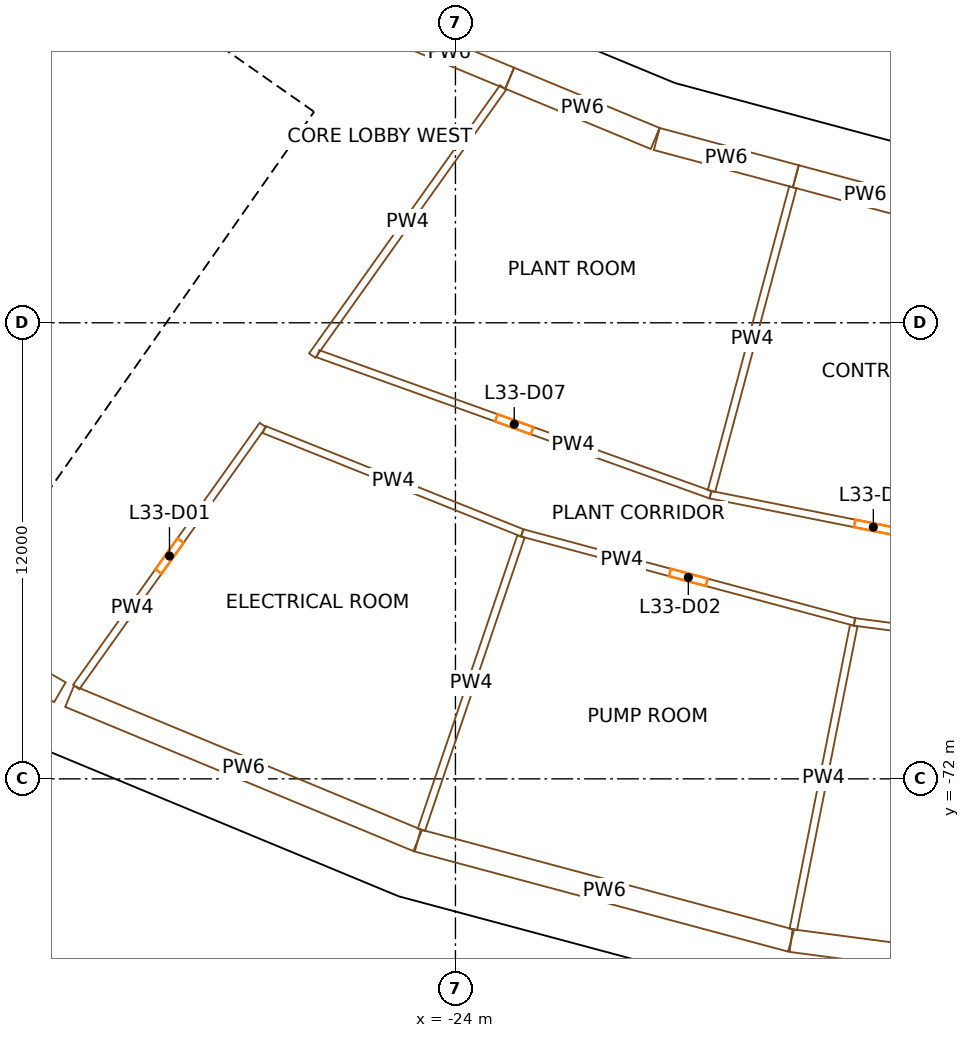
"""IFC4 building model, lengths in metres.
Left out: names, types, materials, properties, quantities, classifications, styles, units other than length and angle.
Written with IfcOpenShell. Run it as: python <this file> out.ifc"""

import sys

from ifc_helpers import new_model, si_unit, direction, frame, frame_2d, origin, origin_2d, place, context, subcontext, project, spatial, rectangle, extrude, element, fill, save


model = new_model("IFC4")
c1 = context("Model", 3, precision=1e-05, world=origin(), true_north=direction((0.0, 1.0)))
c2 = subcontext(c1, "Body", "Model", "MODEL_VIEW")
j1 = project(units=[si_unit("LENGTHUNIT", "METRE"), si_unit("PLANEANGLEUNIT", "RADIAN")], contexts=[c1])
p1 = place(None, origin())
s1 = spatial("IfcSite", under=j1, at=p1, CompositionType="ELEMENT")
p2 = place(p1, origin())
s2 = spatial("IfcBuilding", under=s1, at=p2, CompositionType="ELEMENT")
p3 = place(p2, frame((0.0, 0.0, 144.3)))
s3 = spatial("IfcBuildingStorey", under=s2, at=p3, CompositionType="ELEMENT", Elevation=144.3)
for number, where, z_axis, x_axis in (
    (1, (-25.763, -52.243, 0.0), (0.0, 0.0, 1.0), (0.897, -0.442, 0.0)),
    (2, (-34.388, -69.732, 0.0), (0.0, 0.0, 1.0), (0.897, -0.442, 0.0)),
    (3, (-18.724, -55.159, 0.0), (0.0, 0.0, 1.0), (0.947, -0.321, 0.0)),
    (4, (-24.992, -73.624, 0.0), (0.0, 0.0, 1.0), (0.947, -0.321, 0.0)),
    (5, (-15.168, -76.256, 0.0), (0.0, 0.0, 1.0), (0.981, -0.195, 0.0)),
):
    element("IfcColumn", number, at=place(p3, frame(where, z_axis=z_axis, x_axis=x_axis)), inside=s3, PredefinedType="COLUMN", context=c2, shape_type="SweptSolid", body=[
        extrude(rectangle(XDim=1.2, YDim=1.5, at=origin_2d()), origin(), (0.0, 0.0, 1.0), 5.0),
    ])
p4 = place(p3, frame((-36.717, -66.337, 0.0), z_axis=(0.0, 0.0, 1.0), x_axis=(0.573577477574, 0.819151315216, 0.0)))
e6 = element("IfcWall", 6, at=p4, inside=s3, PredefinedType="SHEAR", context=c2, shape_type="SweptSolid", body=[
    extrude(rectangle(XDim=14.8, YDim=0.9, at=frame_2d((7.4, 0.0))), origin(), (0.0, 0.0, 1.0), 4.7),
])
p5 = place(p4, frame((6.2, 0.0, 0.0)))
e7 = element("IfcOpeningElement", 7, at=p5, cuts=e6, PredefinedType="OPENING", context=c2, shape_type="SweptSolid", body=[
    extrude(rectangle(XDim=2.4, YDim=2.1, at=frame_2d((1.2, 1.05))), frame((0.0, 0.46, 0.0), z_axis=(0.0, -1.0, 0.0), x_axis=(1.0, 0.0, 0.0)), (0.0, 0.0, 1.0), 0.92),
])
p6 = place(p3, frame((-28.854, -54.324, 0.0), z_axis=(0.0, 0.0, 1.0), x_axis=(-0.819145767589, 0.573585400304, 0.0)))
e8 = element("IfcWall", 8, at=p6, inside=s3, PredefinedType="SHEAR", context=c2, shape_type="SweptSolid", body=[
    extrude(rectangle(XDim=15.045, YDim=0.9, at=frame_2d((7.523, 0.0))), origin(), (0.0, 0.0, 1.0), 4.7),
])
p7 = place(p6, frame((3.45, 0.0, 0.0)))
e9 = element("IfcOpeningElement", 9, at=p7, cuts=e8, PredefinedType="OPENING", context=c2, shape_type="SweptSolid", body=[
    extrude(rectangle(XDim=1.0, YDim=2.1, at=frame_2d((0.5, 1.05))), frame((0.0, 0.46, 0.0), z_axis=(0.0, -1.0, 0.0), x_axis=(1.0, 0.0, 0.0)), (0.0, 0.0, 1.0), 0.92),
])
p8 = place(p6, frame((13.495, 0.0, 0.0)))
e10 = element("IfcOpeningElement", 10, at=p8, cuts=e8, PredefinedType="OPENING", context=c2, shape_type="SweptSolid", body=[
    extrude(rectangle(XDim=1.1, YDim=2.1, at=frame_2d((0.55, 1.05))), frame((0.0, 0.46, 0.0), z_axis=(0.0, -1.0, 0.0), x_axis=(1.0, 0.0, 0.0)), (0.0, 0.0, 1.0), 0.92),
])
p9 = place(p3, frame((-31.895, -58.666, 0.0), z_axis=(0.0, 0.0, 1.0), x_axis=(-0.819166993208, 0.573555086491, 0.0)))
e11 = element("IfcWall", 11, at=p9, inside=s3, PredefinedType="SOLIDWALL", context=c2, shape_type="SweptSolid", body=[
    extrude(rectangle(XDim=7.95, YDim=0.3, at=frame_2d((3.975, 0.0))), origin(), (0.0, 0.0, 1.0), 4.7),
])
p10 = place(p9, frame((0.675, 0.0, 0.0)))
e12 = element("IfcOpeningElement", 12, at=p10, cuts=e11, PredefinedType="OPENING", context=c2, shape_type="SweptSolid", body=[
    extrude(rectangle(XDim=1.1, YDim=2.1, at=frame_2d((0.55, 1.05))), frame((0.0, 0.16, 0.0), z_axis=(0.0, -1.0, 0.0), x_axis=(1.0, 0.0, 0.0)), (0.0, 0.0, 1.0), 0.32),
])
p11 = place(p9, frame((3.425, 0.0, 0.0)))
e13 = element("IfcOpeningElement", 13, at=p11, cuts=e11, PredefinedType="OPENING", context=c2, shape_type="SweptSolid", body=[
    extrude(rectangle(XDim=1.1, YDim=2.1, at=frame_2d((0.55, 1.05))), frame((0.0, 0.16, 0.0), z_axis=(0.0, -1.0, 0.0), x_axis=(1.0, 0.0, 0.0)), (0.0, 0.0, 1.0), 0.32),
])
p12 = place(p9, frame((6.175, 0.0, 0.0)))
e14 = element("IfcOpeningElement", 14, at=p12, cuts=e11, PredefinedType="OPENING", context=c2, shape_type="SweptSolid", body=[
    extrude(rectangle(XDim=1.1, YDim=2.1, at=frame_2d((0.55, 1.05))), frame((0.0, 0.16, 0.0), z_axis=(0.0, -1.0, 0.0), x_axis=(1.0, 0.0, 0.0)), (0.0, 0.0, 1.0), 0.32),
])
p13 = place(p3, frame((-30.461, -56.618, 0.0), z_axis=(0.0, 0.0, 1.0), x_axis=(-0.819142461705, 0.573590121456, 0.0)))
e15 = element("IfcWall", 15, at=p13, inside=s3, PredefinedType="SOLIDWALL", context=c2, shape_type="SweptSolid", body=[
    extrude(rectangle(XDim=7.95, YDim=0.3, at=frame_2d((3.975, 0.0))), origin(), (0.0, 0.0, 1.0), 4.7),
])
p14 = place(p3, frame((-33.938, -57.052, 0.0), z_axis=(0.0, 0.0, 1.0), x_axis=(0.573581496053, 0.819148501424, 0.0)))
e16 = element("IfcWall", 16, at=p14, inside=s3, PredefinedType="SOLIDWALL", context=c2, shape_type="SweptSolid", body=[
    extrude(rectangle(XDim=2.2, YDim=0.3, at=frame_2d((1.1, 0.0))), origin(), (0.0, 0.0, 1.0), 4.7),
])
p15 = place(p3, frame((-33.787, -61.369, 3.4), z_axis=(0.0, 0.0, 1.0), x_axis=(-0.819152564888, 0.573575692858, 0.0)))
e17 = element("IfcWall", 17, at=p15, inside=s3, PredefinedType="SOLIDWALL", context=c2, shape_type="SweptSolid", body=[
    extrude(rectangle(XDim=7.95, YDim=0.3, at=frame_2d((3.975, 0.0))), origin(), (0.0, 0.0, 1.0), 1.3),
])
p16 = place(p3, frame((-18.337, -53.861, 0.0), z_axis=(0.0, 0.0, 1.0), x_axis=(-0.923875784142, 0.382692481603, 0.0)))
e18 = element("IfcWall", 18, at=p16, inside=s3, PredefinedType="SOLIDWALL", context=c2, shape_type="SweptSolid", body=[
    extrude(rectangle(XDim=7.342, YDim=0.4, at=frame_2d((3.671, 0.0))), origin(), (0.0, 0.0, 1.0), 3.6),
])
p17 = place(p3, frame((-11.077, -55.813, 0.0), z_axis=(0.0, 0.0, 1.0), x_axis=(-0.965928708291, 0.258808289086, 0.0)))
e19 = element("IfcWall", 19, at=p17, inside=s3, PredefinedType="SOLIDWALL", context=c2, shape_type="SweptSolid", body=[
    extrude(rectangle(XDim=7.493, YDim=0.4, at=frame_2d((3.747, 0.0))), origin(), (0.0, 0.0, 1.0), 3.6),
])
p18 = place(p3, frame((-35.008, -70.933, 0.0), z_axis=(0.0, 0.0, 1.0), x_axis=(0.923878024815, -0.382687072245, 0.0)))
e20 = element("IfcWall", 20, at=p18, inside=s3, PredefinedType="SOLIDWALL", context=c2, shape_type="SweptSolid", body=[
    extrude(rectangle(XDim=10.397, YDim=0.4, at=frame_2d((5.198, 0.0))), origin(), (0.0, 0.0, 1.0), 3.6),
])
p19 = place(p3, frame((-25.377, -74.915, 0.0), z_axis=(0.0, 0.0, 1.0), x_axis=(0.965921778254, -0.258834152101, 0.0)))
e21 = element("IfcWall", 21, at=p19, inside=s3, PredefinedType="SOLIDWALL", context=c2, shape_type="SweptSolid", body=[
    extrude(rectangle(XDim=10.245, YDim=0.4, at=frame_2d((5.123, 0.0))), origin(), (0.0, 0.0, 1.0), 3.6),
])
p20 = place(p3, frame((-43.176, -64.658, 0.0), z_axis=(0.0, 0.0, 1.0), x_axis=(0.866037016931, -0.4999798849, 0.0)))
e22 = element("IfcWall", 22, at=p20, inside=s3, PredefinedType="PARTITIONING", context=c2, shape_type="SweptSolid", body=[
    extrude(rectangle(XDim=10.125, YDim=0.6, at=frame_2d((5.062, 0.0))), origin(), (0.0, 0.0, 1.0), 3.6),
])
p21 = place(p3, frame((-34.153, -69.829, 0.0), z_axis=(0.0, 0.0, 1.0), x_axis=(0.923879094783, -0.382684489133, 0.0)))
e23 = element("IfcWall", 23, at=p21, inside=s3, PredefinedType="PARTITIONING", context=c2, shape_type="SweptSolid", body=[
    extrude(rectangle(XDim=9.916, YDim=0.6, at=frame_2d((4.958, 0.0))), origin(), (0.0, 0.0, 1.0), 3.6),
])
p22 = place(p3, frame((-29.07, -62.69, 0.0), z_axis=(0.0, 0.0, 1.0), x_axis=(-0.580017920191, -0.814603714856, 0.0)))
e24 = element("IfcWall", 24, at=p22, inside=s3, PredefinedType="PARTITIONING", context=c2, shape_type="SweptSolid", body=[
    extrude(rectangle(XDim=8.464, YDim=0.2, at=frame_2d((4.232, 0.0))), origin(), (0.0, 0.0, 1.0), 3.6),
])
p23 = place(p22, frame((3.732, 0.0, 0.0)))
e25 = element("IfcOpeningElement", 25, at=p23, cuts=e24, PredefinedType="OPENING", context=c2, shape_type="SweptSolid", body=[
    extrude(rectangle(XDim=1.0, YDim=2.1, at=frame_2d((0.5, 1.05))), frame((0.0, 0.11, 0.0), z_axis=(0.0, -1.0, 0.0), x_axis=(1.0, 0.0, 0.0)), (0.0, 0.0, 1.0), 0.22),
])
p24 = place(p3, frame((-29.035, -62.808, 0.0), z_axis=(0.0, 0.0, 1.0), x_axis=(0.928343133184, -0.371724396657, 0.0)))
e26 = element("IfcWall", 26, at=p24, inside=s3, PredefinedType="PARTITIONING", context=c2, shape_type="SweptSolid", body=[
    extrude(rectangle(XDim=7.315, YDim=0.2, at=frame_2d((3.658, 0.0))), origin(), (0.0, 0.0, 1.0), 3.6),
])
p25 = place(p3, frame((-27.616, -60.815, 0.0), z_axis=(0.0, 0.0, 1.0), x_axis=(0.941144953961, -0.338003218377, 0.0)))
e27 = element("IfcWall", 27, at=p25, inside=s3, PredefinedType="PARTITIONING", context=c2, shape_type="SweptSolid", body=[
    extrude(rectangle(XDim=10.973, YDim=0.2, at=frame_2d((5.487, 0.0))), origin(), (0.0, 0.0, 1.0), 3.6),
])
p26 = place(p25, frame((4.987, 0.0, 0.0)))
e28 = element("IfcOpeningElement", 28, at=p26, cuts=e27, PredefinedType="OPENING", context=c2, shape_type="SweptSolid", body=[
    extrude(rectangle(XDim=1.0, YDim=2.1, at=frame_2d((0.5, 1.05))), frame((0.0, 0.11, 0.0), z_axis=(0.0, -1.0, 0.0), x_axis=(1.0, 0.0, 0.0)), (0.0, 0.0, 1.0), 0.22),
])
p27 = place(p3, frame((-25.742, -52.251, 0.0), z_axis=(0.0, 0.0, 1.0), x_axis=(0.923868542125, -0.382709964427, 0.0)))
e29 = element("IfcWall", 29, at=p27, inside=s3, PredefinedType="PARTITIONING", context=c2, shape_type="SweptSolid", body=[
    extrude(rectangle(XDim=3.431, YDim=0.6, at=frame_2d((1.716, 0.0))), origin(), (0.0, 0.0, 1.0), 3.6),
])
p28 = place(p3, frame((-24.896, -73.34, 0.0), z_axis=(0.0, 0.0, 1.0), x_axis=(0.321453202328, 0.946925466292, 0.0)))
e30 = element("IfcWall", 30, at=p28, inside=s3, PredefinedType="PARTITIONING", context=c2, shape_type="SweptSolid", body=[
    extrude(rectangle(XDim=8.15, YDim=0.2, at=frame_2d((4.075, 0.0))), origin(), (0.0, 0.0, 1.0), 3.6),
])
p29 = place(p3, frame((-24.992, -73.624, 0.0), z_axis=(0.0, 0.0, 1.0), x_axis=(0.965924263558, -0.258824877223, 0.0)))
e31 = element("IfcWall", 31, at=p29, inside=s3, PredefinedType="PARTITIONING", context=c2, shape_type="SweptSolid", body=[
    extrude(rectangle(XDim=10.17, YDim=0.6, at=frame_2d((5.085, 0.0))), origin(), (0.0, 0.0, 1.0), 3.6),
])
p30 = place(p3, frame((-22.746, -53.809, 0.0), z_axis=(0.0, 0.0, 1.0), x_axis=(-0.580002652606, -0.814614585537, 0.0)))
e32 = element("IfcWall", 32, at=p30, inside=s3, PredefinedType="PARTITIONING", context=c2, shape_type="SweptSolid", body=[
    extrude(rectangle(XDim=8.659, YDim=0.2, at=frame_2d((4.33, 0.0))), origin(), (0.0, 0.0, 1.0), 3.6),
])
p31 = place(p3, frame((-22.572, -53.565, 0.0), z_axis=(0.0, 0.0, 1.0), x_axis=(0.923892575647, -0.382651941932, 0.0)))
e33 = element("IfcWall", 33, at=p31, inside=s3, PredefinedType="PARTITIONING", context=c2, shape_type="SweptSolid", body=[
    extrude(rectangle(XDim=4.143, YDim=0.6, at=frame_2d((2.071, 0.0))), origin(), (0.0, 0.0, 1.0), 3.6),
])
p32 = place(p3, frame((-13.5, -67.87, 0.0), z_axis=(0.0, 0.0, 1.0), x_axis=(-0.965926260719, 0.258817423781, 0.0)))
e34 = element("IfcWall", 34, at=p32, inside=s3, PredefinedType="PARTITIONING", context=c2, shape_type="SweptSolid", body=[
    extrude(rectangle(XDim=9.052, YDim=0.2, at=frame_2d((4.526, 0.0))), origin(), (0.0, 0.0, 1.0), 3.6),
])
p33 = place(p32, frame((4.026, 0.0, 0.0)))
e35 = element("IfcOpeningElement", 35, at=p33, cuts=e34, PredefinedType="OPENING", context=c2, shape_type="SweptSolid", body=[
    extrude(rectangle(XDim=1.0, YDim=2.1, at=frame_2d((0.5, 1.05))), frame((0.0, 0.11, 0.0), z_axis=(0.0, -1.0, 0.0), x_axis=(1.0, 0.0, 0.0)), (0.0, 0.0, 1.0), 0.22),
])
p34 = place(p3, frame((-18.702, -55.165, 0.0), z_axis=(0.0, 0.0, 1.0), x_axis=(0.965920713003, -0.258838127392, 0.0)))
e36 = element("IfcWall", 36, at=p34, inside=s3, PredefinedType="PARTITIONING", context=c2, shape_type="SweptSolid", body=[
    extrude(rectangle(XDim=3.787, YDim=0.6, at=frame_2d((1.894, 0.0))), origin(), (0.0, 0.0, 1.0), 3.6),
])
p35 = place(p3, frame((-17.289, -64.524, 0.0), z_axis=(0.0, 0.0, 1.0), x_axis=(0.980786466832, -0.195084357342, 0.0)))
e37 = element("IfcWall", 37, at=p35, inside=s3, PredefinedType="PARTITIONING", context=c2, shape_type="SweptSolid", body=[
    extrude(rectangle(XDim=8.738, YDim=0.2, at=frame_2d((4.369, 0.0))), origin(), (0.0, 0.0, 1.0), 3.6),
])
p36 = place(p35, frame((3.869, 0.0, 0.0)))
e38 = element("IfcOpeningElement", 38, at=p36, cuts=e37, PredefinedType="OPENING", context=c2, shape_type="SweptSolid", body=[
    extrude(rectangle(XDim=1.0, YDim=2.1, at=frame_2d((0.5, 1.05))), frame((0.0, 0.11, 0.0), z_axis=(0.0, -1.0, 0.0), x_axis=(1.0, 0.0, 0.0)), (0.0, 0.0, 1.0), 0.22),
])
p37 = place(p3, frame((-15.11, -75.962, 0.0), z_axis=(0.0, 0.0, 1.0), x_axis=(0.195102141606, 0.980782929267, 0.0)))
e39 = element("IfcWall", 39, at=p37, inside=s3, PredefinedType="PARTITIONING", context=c2, shape_type="SweptSolid", body=[
    extrude(rectangle(XDim=8.15, YDim=0.2, at=frame_2d((4.075, 0.0))), origin(), (0.0, 0.0, 1.0), 3.6),
])
p38 = place(p3, frame((-15.168, -76.256, 0.0), z_axis=(0.0, 0.0, 1.0), x_axis=(0.991445285184, -0.130522973018, 0.0)))
e40 = element("IfcWall", 40, at=p38, inside=s3, PredefinedType="PARTITIONING", context=c2, shape_type="SweptSolid", body=[
    extrude(rectangle(XDim=10.147, YDim=0.6, at=frame_2d((5.074, 0.0))), origin(), (0.0, 0.0, 1.0), 3.6),
])
p39 = place(p3, frame((-15.122, -56.435, 0.0), z_axis=(0.0, 0.0, 1.0), x_axis=(-0.258815723485, -0.965926716308, 0.0)))
e41 = element("IfcWall", 41, at=p39, inside=s3, PredefinedType="PARTITIONING", context=c2, shape_type="SweptSolid", body=[
    extrude(rectangle(XDim=8.275, YDim=0.2, at=frame_2d((4.137, 0.0))), origin(), (0.0, 0.0, 1.0), 3.6),
])
p40 = place(p3, frame((-15.044, -56.145, 0.0), z_axis=(0.0, 0.0, 1.0), x_axis=(0.965936829447, -0.258777977267, 0.0)))
e42 = element("IfcWall", 42, at=p40, inside=s3, PredefinedType="PARTITIONING", context=c2, shape_type="SweptSolid", body=[
    extrude(rectangle(XDim=3.787, YDim=0.6, at=frame_2d((1.894, 0.0))), origin(), (0.0, 0.0, 1.0), 3.6),
])
p41 = place(p3, frame((-13.5, -67.87, 0.0), z_axis=(0.0, 0.0, 1.0), x_axis=(0.991445838679, -0.130518768632, 0.0)))
e43 = element("IfcWall", 43, at=p41, inside=s3, PredefinedType="PARTITIONING", context=c2, shape_type="SweptSolid", body=[
    extrude(rectangle(XDim=9.042, YDim=0.2, at=frame_2d((4.521, 0.0))), origin(), (0.0, 0.0, 1.0), 3.6),
])
p42 = place(p5, origin())
e44 = element("IfcDoor", 44, at=p42, inside=s3, OperationType="DOUBLE_DOOR_SINGLE_SWING", PredefinedType="DOOR", context=c2, shape_type="SweptSolid", body=[
    extrude(rectangle(XDim=2.4, YDim=2.1, at=frame_2d((1.2, 1.05))), frame((0.0, 0.025, 0.0), z_axis=(0.0, -1.0, 0.0), x_axis=(1.0, 0.0, 0.0)), (0.0, 0.0, 1.0), 0.05),
])
fill(e7, e44)
p43 = place(p10, origin())
e45 = element("IfcDoor", 45, at=p43, inside=s3, OperationType="DOUBLE_DOOR_SLIDING", PredefinedType="DOOR", context=c2, shape_type="SweptSolid", body=[
    extrude(rectangle(XDim=1.1, YDim=2.1, at=frame_2d((0.55, 1.05))), frame((0.0, 0.025, 0.0), z_axis=(0.0, -1.0, 0.0), x_axis=(1.0, 0.0, 0.0)), (0.0, 0.0, 1.0), 0.05),
])
fill(e12, e45)
p44 = place(p23, origin())
e46 = element("IfcDoor", 46, at=p44, inside=s3, OperationType="SINGLE_SWING_RIGHT", PredefinedType="DOOR", context=c2, shape_type="SweptSolid", body=[
    extrude(rectangle(XDim=1.0, YDim=2.1, at=frame_2d((0.5, 1.05))), frame((0.0, 0.025, 0.0), z_axis=(0.0, -1.0, 0.0), x_axis=(1.0, 0.0, 0.0)), (0.0, 0.0, 1.0), 0.05),
])
fill(e25, e46)
p45 = place(p33, origin())
e47 = element("IfcDoor", 47, at=p45, inside=s3, OperationType="SINGLE_SWING_RIGHT", PredefinedType="DOOR", context=c2, shape_type="SweptSolid", body=[
    extrude(rectangle(XDim=1.0, YDim=2.1, at=frame_2d((0.5, 1.05))), frame((0.0, 0.025, 0.0), z_axis=(0.0, -1.0, 0.0), x_axis=(1.0, 0.0, 0.0)), (0.0, 0.0, 1.0), 0.05),
])
fill(e35, e47)
p46 = place(p26, origin())
e48 = element("IfcDoor", 48, at=p46, inside=s3, OperationType="SINGLE_SWING_RIGHT", PredefinedType="DOOR", context=c2, shape_type="SweptSolid", body=[
    extrude(rectangle(XDim=1.0, YDim=2.1, at=frame_2d((0.5, 1.05))), frame((0.0, 0.025, 0.0), z_axis=(0.0, -1.0, 0.0), x_axis=(1.0, 0.0, 0.0)), (0.0, 0.0, 1.0), 0.05),
])
fill(e28, e48)
p47 = place(p36, origin())
e49 = element("IfcDoor", 49, at=p47, inside=s3, OperationType="SINGLE_SWING_RIGHT", PredefinedType="DOOR", context=c2, shape_type="SweptSolid", body=[
    extrude(rectangle(XDim=1.0, YDim=2.1, at=frame_2d((0.5, 1.05))), frame((0.0, 0.025, 0.0), z_axis=(0.0, -1.0, 0.0), x_axis=(1.0, 0.0, 0.0)), (0.0, 0.0, 1.0), 0.05),
])
fill(e38, e49)
save(model, sys.argv[1])
